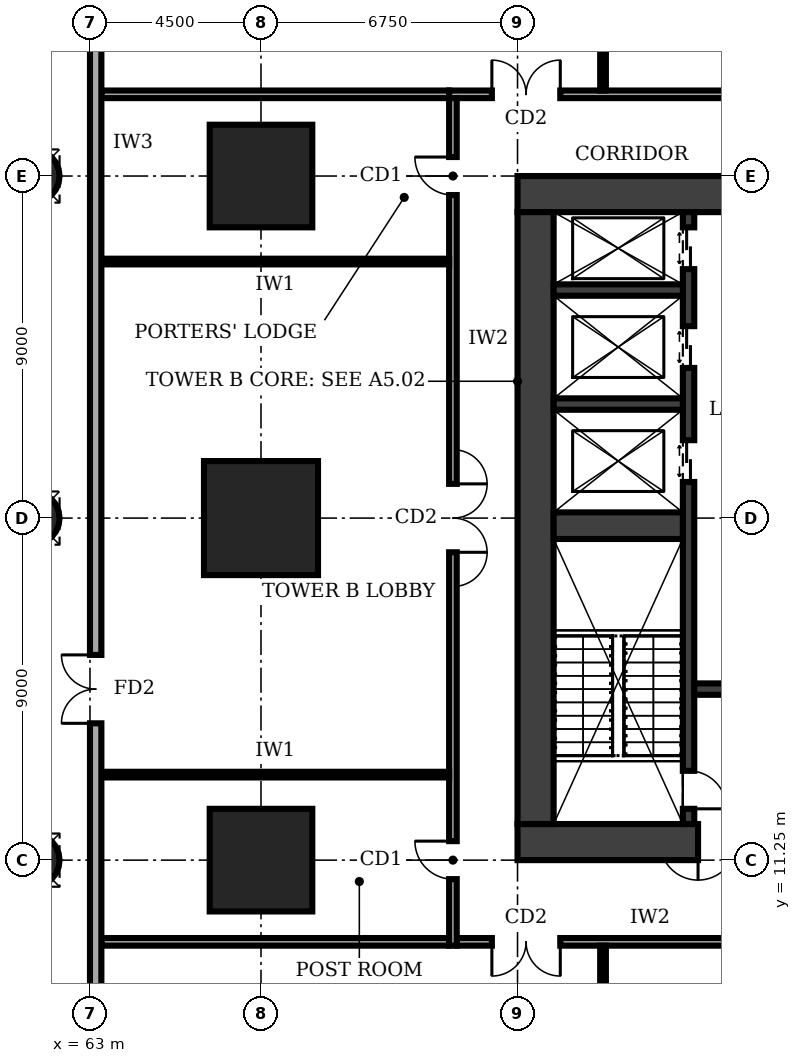
"""IFC4 building model, lengths in metres.
Left out: names, types, materials, properties, quantities, classifications, styles, units other than length and angle.
Written with IfcOpenShell. Run it as: python <this file> out.ifc"""

import sys

from ifc_helpers import new_model, si_unit, direction, frame, frame_2d, origin, origin_2d, place, context, subcontext, project, spatial, rectangle, circle, extrude, element, fill, save


model = new_model("IFC4")
c1 = context("Model", 3, precision=1e-05, world=origin(), true_north=direction((0.0, 1.0)))
c2 = subcontext(c1, "Body", "Model", "MODEL_VIEW")
j1 = project(units=[si_unit("LENGTHUNIT", "METRE"), si_unit("PLANEANGLEUNIT", "RADIAN")], contexts=[c1])
p1 = place(None, origin())
s1 = spatial("IfcSite", under=j1, at=p1, CompositionType="ELEMENT")
p2 = place(p1, origin())
s2 = spatial("IfcBuilding", under=s1, at=p2, CompositionType="ELEMENT")
p3 = place(p2, origin())
s3 = spatial("IfcBuildingStorey", under=s2, at=p3, CompositionType="ELEMENT", Elevation=0.0)
p4 = place(p3, frame((74.25, 11.725, -0.4), z_axis=(0.0, 0.0, 1.0), x_axis=(1.0, 0.0, 0.0)))
e1 = element("IfcWall", 1, at=p4, inside=s3, PredefinedType="SHEAR", context=c2, shape_type="SweptSolid", body=[
    extrude(rectangle(XDim=13.5, YDim=0.95, at=frame_2d((6.75, 0.0))), origin(), (0.0, 0.0, 1.0), 6.4),
])
p5 = place(p4, frame((4.75, 0.0, 0.4)))
e2 = element("IfcOpeningElement", 2, at=p5, cuts=e1, PredefinedType="OPENING", context=c2, shape_type="SweptSolid", body=[
    extrude(rectangle(XDim=1.0, YDim=2.1, at=frame_2d((0.5, 1.05))), frame((0.0, 0.485, 0.0), z_axis=(0.0, -1.0, 0.0), x_axis=(1.0, 0.0, 0.0)), (0.0, 0.0, 1.0), 0.97),
])
p6 = place(p3, frame((87.75, 28.775, -0.4), z_axis=(0.0, 0.0, 1.0), x_axis=(-1.0, 0.0, 0.0)))
e3 = element("IfcWall", 3, at=p6, inside=s3, PredefinedType="SHEAR", context=c2, shape_type="SweptSolid", body=[
    extrude(rectangle(XDim=13.5, YDim=0.95, at=frame_2d((6.75, 0.0))), origin(), (0.0, 0.0, 1.0), 6.4),
])
p7 = place(p6, frame((4.75, 0.0, 0.4)))
e4 = element("IfcOpeningElement", 4, at=p7, cuts=e3, PredefinedType="OPENING", context=c2, shape_type="SweptSolid", body=[
    extrude(rectangle(XDim=1.8, YDim=2.1, at=frame_2d((0.9, 1.05))), frame((0.0, 0.485, 0.0), z_axis=(0.0, -1.0, 0.0), x_axis=(1.0, 0.0, 0.0)), (0.0, 0.0, 1.0), 0.97),
])
p8 = place(p3, frame((74.725, 28.3, -0.4), z_axis=(0.0, 0.0, 1.0), x_axis=(0.0, -1.0, 0.0)))
e5 = element("IfcWall", 5, at=p8, inside=s3, PredefinedType="SHEAR", context=c2, shape_type="SweptSolid", body=[
    extrude(rectangle(XDim=16.1, YDim=0.95, at=frame_2d((8.05, 0.0))), origin(), (0.0, 0.0, 1.0), 6.4),
])
p9 = place(p3, frame((78.75, 12.2, -0.4), z_axis=(0.0, 0.0, 1.0), x_axis=(0.0, 1.0, 0.0)))
e6 = element("IfcWall", 6, at=p9, inside=s3, PredefinedType="SHEAR", context=c2, shape_type="SweptSolid", body=[
    extrude(rectangle(XDim=16.1, YDim=0.3, at=frame_2d((8.05, 0.0))), origin(), (0.0, 0.0, 1.0), 6.4),
])
p10 = place(p9, frame((0.4, 0.0, 0.4)))
e7 = element("IfcOpeningElement", 7, at=p10, cuts=e6, PredefinedType="OPENING", context=c2, shape_type="SweptSolid", body=[
    extrude(rectangle(XDim=1.0, YDim=2.1, at=frame_2d((0.5, 1.05))), frame((0.0, 0.16, 0.0), z_axis=(0.0, -1.0, 0.0), x_axis=(1.0, 0.0, 0.0)), (0.0, 0.0, 1.0), 0.32),
])
p11 = place(p9, frame((9.0, 0.0, 0.4)))
e8 = element("IfcOpeningElement", 8, at=p11, cuts=e6, PredefinedType="OPENING", context=c2, shape_type="SweptSolid", body=[
    extrude(rectangle(XDim=1.1, YDim=2.1, at=frame_2d((0.55, 1.05))), frame((0.0, 0.16, 0.0), z_axis=(0.0, -1.0, 0.0), x_axis=(1.0, 0.0, 0.0)), (0.0, 0.0, 1.0), 0.32),
])
p12 = place(p9, frame((12.0, 0.0, 0.4)))
e9 = element("IfcOpeningElement", 9, at=p12, cuts=e6, PredefinedType="OPENING", context=c2, shape_type="SweptSolid", body=[
    extrude(rectangle(XDim=1.1, YDim=2.1, at=frame_2d((0.55, 1.05))), frame((0.0, 0.16, 0.0), z_axis=(0.0, -1.0, 0.0), x_axis=(1.0, 0.0, 0.0)), (0.0, 0.0, 1.0), 0.32),
])
p13 = place(p9, frame((14.6, 0.0, 0.4)))
e10 = element("IfcOpeningElement", 10, at=p13, cuts=e6, PredefinedType="OPENING", context=c2, shape_type="SweptSolid", body=[
    extrude(rectangle(XDim=1.1, YDim=2.1, at=frame_2d((0.55, 1.05))), frame((0.0, 0.16, 0.0), z_axis=(0.0, -1.0, 0.0), x_axis=(1.0, 0.0, 0.0)), (0.0, 0.0, 1.0), 0.32),
])
p14 = place(p3, frame((75.2, 20.05, -0.4), z_axis=(0.0, 0.0, 1.0), x_axis=(1.0, 0.0, 0.0)))
e11 = element("IfcWall", 11, at=p14, inside=s3, PredefinedType="SHEAR", context=c2, shape_type="SweptSolid", body=[
    extrude(rectangle(XDim=3.4, YDim=0.7, at=frame_2d((1.7, 0.0))), origin(), (0.0, 0.0, 1.0), 6.4),
])
p15 = place(p3, frame((78.9, 15.75, -0.4), z_axis=(0.0, 0.0, 1.0), x_axis=(1.0, 0.0, 0.0)))
e12 = element("IfcWall", 12, at=p15, inside=s3, PredefinedType="SHEAR", context=c2, shape_type="SweptSolid", body=[
    extrude(rectangle(XDim=4.2, YDim=0.3, at=frame_2d((2.1, 0.0))), origin(), (0.0, 0.0, 1.0), 6.4),
])
p16 = place(p15, frame((1.6, 0.0, 0.4)))
e13 = element("IfcOpeningElement", 13, at=p16, cuts=e12, PredefinedType="OPENING", context=c2, shape_type="SweptSolid", body=[
    extrude(rectangle(XDim=1.0, YDim=2.1, at=frame_2d((0.5, 1.05))), frame((0.0, 0.16, 0.0), z_axis=(0.0, -1.0, 0.0), x_axis=(1.0, 0.0, 0.0)), (0.0, 0.0, 1.0), 0.32),
])
for number, where, z_axis, x_axis in (
    (14, (75.2, 23.25, -0.4), (0.0, 0.0, 1.0), (1.0, 0.0, 0.0)),
    (15, (75.2, 26.25, -0.4), (0.0, 0.0, 1.0), (1.0, 0.0, 0.0)),
):
    element("IfcWall", number, at=place(p3, frame(where, z_axis=z_axis, x_axis=x_axis)), inside=s3, PredefinedType="SHEAR", context=c2, shape_type="SweptSolid", body=[
        extrude(rectangle(XDim=3.4, YDim=0.3, at=frame_2d((1.7, 0.0))), origin(), (0.0, 0.0, 1.0), 6.4),
    ])
p17 = place(p3, frame((67.5, 11.25, -0.4), z_axis=(0.0, 0.0, 1.0), x_axis=(1.0, 0.0, 0.0)))
e16 = element("IfcColumn", 16, at=p17, inside=s3, PredefinedType="COLUMN", context=c2, shape_type="SweptSolid", body=[
    extrude(rectangle(XDim=2.7, YDim=2.7, at=origin_2d()), origin(), (0.0, 0.0, 1.0), 6.4),
])
p18 = place(p3, frame((67.5, 20.25, -0.4), z_axis=(0.0, 0.0, 1.0), x_axis=(1.0, 0.0, 0.0)))
e17 = element("IfcColumn", 17, at=p18, inside=s3, PredefinedType="COLUMN", context=c2, shape_type="SweptSolid", body=[
    extrude(rectangle(XDim=3.0, YDim=3.0, at=origin_2d()), origin(), (0.0, 0.0, 1.0), 6.4),
])
p19 = place(p3, frame((67.5, 29.25, -0.4), z_axis=(0.0, 0.0, 1.0), x_axis=(1.0, 0.0, 0.0)))
e18 = element("IfcColumn", 18, at=p19, inside=s3, PredefinedType="COLUMN", context=c2, shape_type="SweptSolid", body=[
    extrude(rectangle(XDim=2.7, YDim=2.7, at=origin_2d()), origin(), (0.0, 0.0, 1.0), 6.4),
])
for number, where, z_axis, x_axis in (
    (19, (61.5, 11.25, -0.4), (0.0, 0.0, 1.0), (1.0, 0.0, 0.0)),
    (20, (61.5, 20.25, -0.4), (0.0, 0.0, 1.0), (1.0, 0.0, 0.0)),
    (21, (61.5, 29.25, -0.4), (0.0, 0.0, 1.0), (1.0, 0.0, 0.0)),
):
    element("IfcColumn", number, at=place(p3, frame(where, z_axis=z_axis, x_axis=x_axis)), inside=s3, PredefinedType="COLUMN", context=c2, shape_type="SweptSolid", body=[
        extrude(circle(Radius=0.7, at=origin_2d()), origin(), (0.0, 0.0, 1.0), 6.4),
    ])
p20 = place(p3, frame((72.65, 9.1, 0.0), z_axis=(0.0, 0.0, 1.0), x_axis=(1.0, 0.0, 0.0)))
e22 = element("IfcWall", 22, at=p20, inside=s3, PredefinedType="SOLIDWALL", context=c2, shape_type="SweptSolid", body=[
    extrude(rectangle(XDim=16.9, YDim=0.2, at=frame_2d((8.45, 0.0))), origin(), (0.0, 0.0, 1.0), 5.7),
])
p21 = place(p20, frame((0.925, 0.0, 0.0)))
e23 = element("IfcOpeningElement", 23, at=p21, cuts=e22, PredefinedType="OPENING", context=c2, shape_type="SweptSolid", body=[
    extrude(rectangle(XDim=1.8, YDim=2.1, at=frame_2d((0.9, 1.05))), frame((0.0, 0.11, 0.0), z_axis=(0.0, -1.0, 0.0), x_axis=(1.0, 0.0, 0.0)), (0.0, 0.0, 1.0), 0.22),
])
p22 = place(p20, frame((7.45, 0.0, 0.0)))
e24 = element("IfcOpeningElement", 24, at=p22, cuts=e22, PredefinedType="OPENING", context=c2, shape_type="SweptSolid", body=[
    extrude(rectangle(XDim=1.8, YDim=2.1, at=frame_2d((0.9, 1.05))), frame((0.0, 0.11, 0.0), z_axis=(0.0, -1.0, 0.0), x_axis=(1.0, 0.0, 0.0)), (0.0, 0.0, 1.0), 0.22),
])
p23 = place(p20, frame((13.975, 0.0, 0.0)))
e25 = element("IfcOpeningElement", 25, at=p23, cuts=e22, PredefinedType="OPENING", context=c2, shape_type="SweptSolid", body=[
    extrude(rectangle(XDim=1.8, YDim=2.1, at=frame_2d((0.9, 1.05))), frame((0.0, 0.11, 0.0), z_axis=(0.0, -1.0, 0.0), x_axis=(1.0, 0.0, 0.0)), (0.0, 0.0, 1.0), 0.22),
])
p24 = place(p3, frame((89.35, 31.4, 0.0), z_axis=(0.0, 0.0, 1.0), x_axis=(-1.0, 0.0, 0.0)))
e26 = element("IfcWall", 26, at=p24, inside=s3, PredefinedType="SOLIDWALL", context=c2, shape_type="SweptSolid", body=[
    extrude(rectangle(XDim=16.9, YDim=0.2, at=frame_2d((8.45, 0.0))), origin(), (0.0, 0.0, 1.0), 5.7),
])
p25 = place(p24, frame((13.975, 0.0, 0.0)))
e27 = element("IfcOpeningElement", 27, at=p25, cuts=e26, PredefinedType="OPENING", context=c2, shape_type="SweptSolid", body=[
    extrude(rectangle(XDim=1.8, YDim=2.1, at=frame_2d((0.9, 1.05))), frame((0.0, 0.11, 0.0), z_axis=(0.0, -1.0, 0.0), x_axis=(1.0, 0.0, 0.0)), (0.0, 0.0, 1.0), 0.22),
])
p26 = place(p24, frame((7.85, 0.0, 0.0)))
e28 = element("IfcOpeningElement", 28, at=p26, cuts=e26, PredefinedType="OPENING", context=c2, shape_type="SweptSolid", body=[
    extrude(rectangle(XDim=1.0, YDim=2.1, at=frame_2d((0.5, 1.05))), frame((0.0, 0.11, 0.0), z_axis=(0.0, -1.0, 0.0), x_axis=(1.0, 0.0, 0.0)), (0.0, 0.0, 1.0), 0.22),
])
p27 = place(p24, frame((0.925, 0.0, 0.0)))
e29 = element("IfcOpeningElement", 29, at=p27, cuts=e26, PredefinedType="OPENING", context=c2, shape_type="SweptSolid", body=[
    extrude(rectangle(XDim=1.8, YDim=2.1, at=frame_2d((0.9, 1.05))), frame((0.0, 0.11, 0.0), z_axis=(0.0, -1.0, 0.0), x_axis=(1.0, 0.0, 0.0)), (0.0, 0.0, 1.0), 0.22),
])
p28 = place(p3, frame((72.55, 31.3, 0.0), z_axis=(0.0, 0.0, 1.0), x_axis=(0.0, -1.0, 0.0)))
e30 = element("IfcWall", 30, at=p28, inside=s3, PredefinedType="SOLIDWALL", context=c2, shape_type="SweptSolid", body=[
    extrude(rectangle(XDim=22.3, YDim=0.2, at=frame_2d((11.15, 0.0))), origin(), (0.0, 0.0, 1.0), 5.7),
])
p29 = place(p28, frame((19.55, 0.0, 0.0)))
e31 = element("IfcOpeningElement", 31, at=p29, cuts=e30, PredefinedType="OPENING", context=c2, shape_type="SweptSolid", body=[
    extrude(rectangle(XDim=1.0, YDim=2.1, at=frame_2d((0.5, 1.05))), frame((0.0, 0.11, 0.0), z_axis=(0.0, -1.0, 0.0), x_axis=(1.0, 0.0, 0.0)), (0.0, 0.0, 1.0), 0.22),
])
p30 = place(p28, frame((10.15, 0.0, 0.0)))
e32 = element("IfcOpeningElement", 32, at=p30, cuts=e30, PredefinedType="OPENING", context=c2, shape_type="SweptSolid", body=[
    extrude(rectangle(XDim=1.8, YDim=2.1, at=frame_2d((0.9, 1.05))), frame((0.0, 0.11, 0.0), z_axis=(0.0, -1.0, 0.0), x_axis=(1.0, 0.0, 0.0)), (0.0, 0.0, 1.0), 0.22),
])
p31 = place(p28, frame((1.55, 0.0, 0.0)))
e33 = element("IfcOpeningElement", 33, at=p31, cuts=e30, PredefinedType="OPENING", context=c2, shape_type="SweptSolid", body=[
    extrude(rectangle(XDim=1.0, YDim=2.1, at=frame_2d((0.5, 1.05))), frame((0.0, 0.11, 0.0), z_axis=(0.0, -1.0, 0.0), x_axis=(1.0, 0.0, 0.0)), (0.0, 0.0, 1.0), 0.22),
])
for number, where, z_axis, x_axis in (
    (34, (63.3, 9.1, 0.0), (0.0, 0.0, 1.0), (1.0, 0.0, 0.0)),
    (35, (63.3, 31.4, 0.0), (0.0, 0.0, 1.0), (1.0, 0.0, 0.0)),
):
    element("IfcWall", number, at=place(p3, frame(where, z_axis=z_axis, x_axis=x_axis)), inside=s3, PredefinedType="SOLIDWALL", context=c2, shape_type="SweptSolid", body=[
        extrude(rectangle(XDim=9.15, YDim=0.2, at=frame_2d((4.575, 0.0))), origin(), (0.0, 0.0, 1.0), 5.7),
    ])
p32 = place(p3, frame((76.5, -4.32, 0.0), z_axis=(0.0, 0.0, 1.0), x_axis=(0.0, 1.0, 0.0)))
e36 = element("IfcWall", 36, at=p32, inside=s3, PredefinedType="PARTITIONING", context=c2, shape_type="SweptSolid", body=[
    extrude(rectangle(XDim=13.32, YDim=0.15, at=frame_2d((6.66, 0.0))), origin(), (0.0, 0.0, 1.0), 5.7),
])
p33 = place(p3, frame((76.5, 31.5, 0.0), z_axis=(0.0, 0.0, 1.0), x_axis=(0.0, 1.0, 0.0)))
e37 = element("IfcWall", 37, at=p33, inside=s3, PredefinedType="PARTITIONING", context=c2, shape_type="SweptSolid", body=[
    extrude(rectangle(XDim=17.82, YDim=0.15, at=frame_2d((8.91, 0.0))), origin(), (0.0, 0.0, 1.0), 5.7),
])
p34 = place(p33, frame((12.85, 0.0, 0.0)))
e38 = element("IfcOpeningElement", 38, at=p34, cuts=e37, PredefinedType="OPENING", context=c2, shape_type="SweptSolid", body=[
    extrude(rectangle(XDim=1.0, YDim=2.1, at=frame_2d((0.5, 1.05))), frame((0.0, 0.085, 0.0), z_axis=(0.0, -1.0, 0.0), x_axis=(1.0, 0.0, 0.0)), (0.0, 0.0, 1.0), 0.17),
])
for number, where, z_axis, x_axis in (
    (39, (63.3, 13.5, 0.0), (0.0, 0.0, 1.0), (1.0, 0.0, 0.0)),
    (40, (63.3, 27.0, 0.0), (0.0, 0.0, 1.0), (1.0, 0.0, 0.0)),
):
    element("IfcWall", number, at=place(p3, frame(where, z_axis=z_axis, x_axis=x_axis)), inside=s3, PredefinedType="PARTITIONING", context=c2, shape_type="SweptSolid", body=[
        extrude(rectangle(XDim=9.15, YDim=0.15, at=frame_2d((4.575, 0.0))), origin(), (0.0, 0.0, 1.0), 5.7),
    ])
p35 = place(p3, frame((63.15, 4.97, 0.0), z_axis=(0.0, 0.0, 1.0), x_axis=(0.0, 1.0, 0.0)))
e41 = element("IfcWall", 41, at=p35, inside=s3, PredefinedType="SOLIDWALL", context=c2, shape_type="SweptSolid", body=[
    extrude(rectangle(XDim=43.16, YDim=0.3, at=frame_2d((21.58, 0.0))), origin(), (0.0, 0.0, 1.0), 5.7),
])
p36 = place(p35, frame((9.88, 0.0, 0.0)))
e42 = element("IfcOpeningElement", 42, at=p36, cuts=e41, PredefinedType="OPENING", context=c2, shape_type="SweptSolid", body=[
    extrude(rectangle(XDim=1.8, YDim=2.1, at=frame_2d((0.9, 1.05))), frame((0.0, 0.16, 0.0), z_axis=(0.0, -1.0, 0.0), x_axis=(1.0, 0.0, 0.0)), (0.0, 0.0, 1.0), 0.32),
])
p37 = place(p35, frame((38.63, 0.0, 0.0)))
e43 = element("IfcOpeningElement", 43, at=p37, cuts=e41, PredefinedType="OPENING", context=c2, shape_type="SweptSolid", body=[
    extrude(rectangle(XDim=1.8, YDim=2.1, at=frame_2d((0.9, 1.05))), frame((0.0, 0.16, 0.0), z_axis=(0.0, -1.0, 0.0), x_axis=(1.0, 0.0, 0.0)), (0.0, 0.0, 1.0), 0.32),
])
p38 = place(p5, frame((1.0, 0.0, 0.0), z_axis=(0.0, 0.0, 1.0), x_axis=(-1.0, 0.0, 0.0)))
e44 = element("IfcDoor", 44, at=p38, inside=s3, OperationType="SINGLE_SWING_RIGHT", PredefinedType="DOOR", context=c2, shape_type="SweptSolid", body=[
    extrude(rectangle(XDim=1.0, YDim=2.1, at=frame_2d((0.5, 1.05))), frame((0.0, 0.025, 0.0), z_axis=(0.0, -1.0, 0.0), x_axis=(1.0, 0.0, 0.0)), (0.0, 0.0, 1.0), 0.05),
])
fill(e2, e44)
p39 = place(p10, frame((1.0, 0.0, 0.0), z_axis=(0.0, 0.0, 1.0), x_axis=(-1.0, 0.0, 0.0)))
e45 = element("IfcDoor", 45, at=p39, inside=s3, OperationType="SINGLE_SWING_RIGHT", PredefinedType="DOOR", context=c2, shape_type="SweptSolid", body=[
    extrude(rectangle(XDim=1.0, YDim=2.1, at=frame_2d((0.5, 1.05))), frame((0.0, 0.025, 0.0), z_axis=(0.0, -1.0, 0.0), x_axis=(1.0, 0.0, 0.0)), (0.0, 0.0, 1.0), 0.05),
])
fill(e7, e45)
p40 = place(p11, origin())
e46 = element("IfcDoor", 46, at=p40, inside=s3, OperationType="DOUBLE_DOOR_SLIDING", PredefinedType="DOOR", context=c2, shape_type="SweptSolid", body=[
    extrude(rectangle(XDim=1.1, YDim=2.1, at=frame_2d((0.55, 1.05))), frame((0.0, 0.025, 0.0), z_axis=(0.0, -1.0, 0.0), x_axis=(1.0, 0.0, 0.0)), (0.0, 0.0, 1.0), 0.05),
])
fill(e8, e46)
p41 = place(p12, origin())
e47 = element("IfcDoor", 47, at=p41, inside=s3, OperationType="DOUBLE_DOOR_SLIDING", PredefinedType="DOOR", context=c2, shape_type="SweptSolid", body=[
    extrude(rectangle(XDim=1.1, YDim=2.1, at=frame_2d((0.55, 1.05))), frame((0.0, 0.025, 0.0), z_axis=(0.0, -1.0, 0.0), x_axis=(1.0, 0.0, 0.0)), (0.0, 0.0, 1.0), 0.05),
])
fill(e9, e47)
p42 = place(p13, origin())
e48 = element("IfcDoor", 48, at=p42, inside=s3, OperationType="DOUBLE_DOOR_SLIDING", PredefinedType="DOOR", context=c2, shape_type="SweptSolid", body=[
    extrude(rectangle(XDim=1.1, YDim=2.1, at=frame_2d((0.55, 1.05))), frame((0.0, 0.025, 0.0), z_axis=(0.0, -1.0, 0.0), x_axis=(1.0, 0.0, 0.0)), (0.0, 0.0, 1.0), 0.05),
])
fill(e10, e48)
p43 = place(p21, frame((1.8, 0.0, 0.0), z_axis=(0.0, 0.0, 1.0), x_axis=(-1.0, 0.0, 0.0)))
e49 = element("IfcDoor", 49, at=p43, inside=s3, OperationType="DOUBLE_DOOR_SINGLE_SWING", PredefinedType="DOOR", context=c2, shape_type="SweptSolid", body=[
    extrude(rectangle(XDim=1.8, YDim=2.1, at=frame_2d((0.9, 1.05))), frame((0.0, 0.025, 0.0), z_axis=(0.0, -1.0, 0.0), x_axis=(1.0, 0.0, 0.0)), (0.0, 0.0, 1.0), 0.05),
])
fill(e23, e49)
p44 = place(p25, frame((1.8, 0.0, 0.0), z_axis=(0.0, 0.0, 1.0), x_axis=(-1.0, 0.0, 0.0)))
e50 = element("IfcDoor", 50, at=p44, inside=s3, OperationType="DOUBLE_DOOR_SINGLE_SWING", PredefinedType="DOOR", context=c2, shape_type="SweptSolid", body=[
    extrude(rectangle(XDim=1.8, YDim=2.1, at=frame_2d((0.9, 1.05))), frame((0.0, 0.025, 0.0), z_axis=(0.0, -1.0, 0.0), x_axis=(1.0, 0.0, 0.0)), (0.0, 0.0, 1.0), 0.05),
])
fill(e27, e50)
p45 = place(p29, frame((1.0, 0.0, 0.0), z_axis=(0.0, 0.0, 1.0), x_axis=(-1.0, 0.0, 0.0)))
e51 = element("IfcDoor", 51, at=p45, inside=s3, OperationType="SINGLE_SWING_RIGHT", PredefinedType="DOOR", context=c2, shape_type="SweptSolid", body=[
    extrude(rectangle(XDim=1.0, YDim=2.1, at=frame_2d((0.5, 1.05))), frame((0.0, 0.025, 0.0), z_axis=(0.0, -1.0, 0.0), x_axis=(1.0, 0.0, 0.0)), (0.0, 0.0, 1.0), 0.05),
])
fill(e31, e51)
p46 = place(p30, origin())
e52 = element("IfcDoor", 52, at=p46, inside=s3, OperationType="DOUBLE_DOOR_SINGLE_SWING", PredefinedType="DOOR", context=c2, shape_type="SweptSolid", body=[
    extrude(rectangle(XDim=1.8, YDim=2.1, at=frame_2d((0.9, 1.05))), frame((0.0, 0.025, 0.0), z_axis=(0.0, -1.0, 0.0), x_axis=(1.0, 0.0, 0.0)), (0.0, 0.0, 1.0), 0.05),
])
fill(e32, e52)
p47 = place(p31, frame((1.0, 0.0, 0.0), z_axis=(0.0, 0.0, 1.0), x_axis=(-1.0, 0.0, 0.0)))
e53 = element("IfcDoor", 53, at=p47, inside=s3, OperationType="SINGLE_SWING_RIGHT", PredefinedType="DOOR", context=c2, shape_type="SweptSolid", body=[
    extrude(rectangle(XDim=1.0, YDim=2.1, at=frame_2d((0.5, 1.05))), frame((0.0, 0.025, 0.0), z_axis=(0.0, -1.0, 0.0), x_axis=(1.0, 0.0, 0.0)), (0.0, 0.0, 1.0), 0.05),
])
fill(e33, e53)
p48 = place(p36, origin())
e54 = element("IfcDoor", 54, at=p48, inside=s3, OperationType="DOUBLE_DOOR_SINGLE_SWING", PredefinedType="DOOR", context=c2, shape_type="SweptSolid", body=[
    extrude(rectangle(XDim=1.8, YDim=2.1, at=frame_2d((0.9, 1.05))), frame((0.0, 0.025, 0.0), z_axis=(0.0, -1.0, 0.0), x_axis=(1.0, 0.0, 0.0)), (0.0, 0.0, 1.0), 0.05),
])
fill(e42, e54)
save(model, sys.argv[1])
